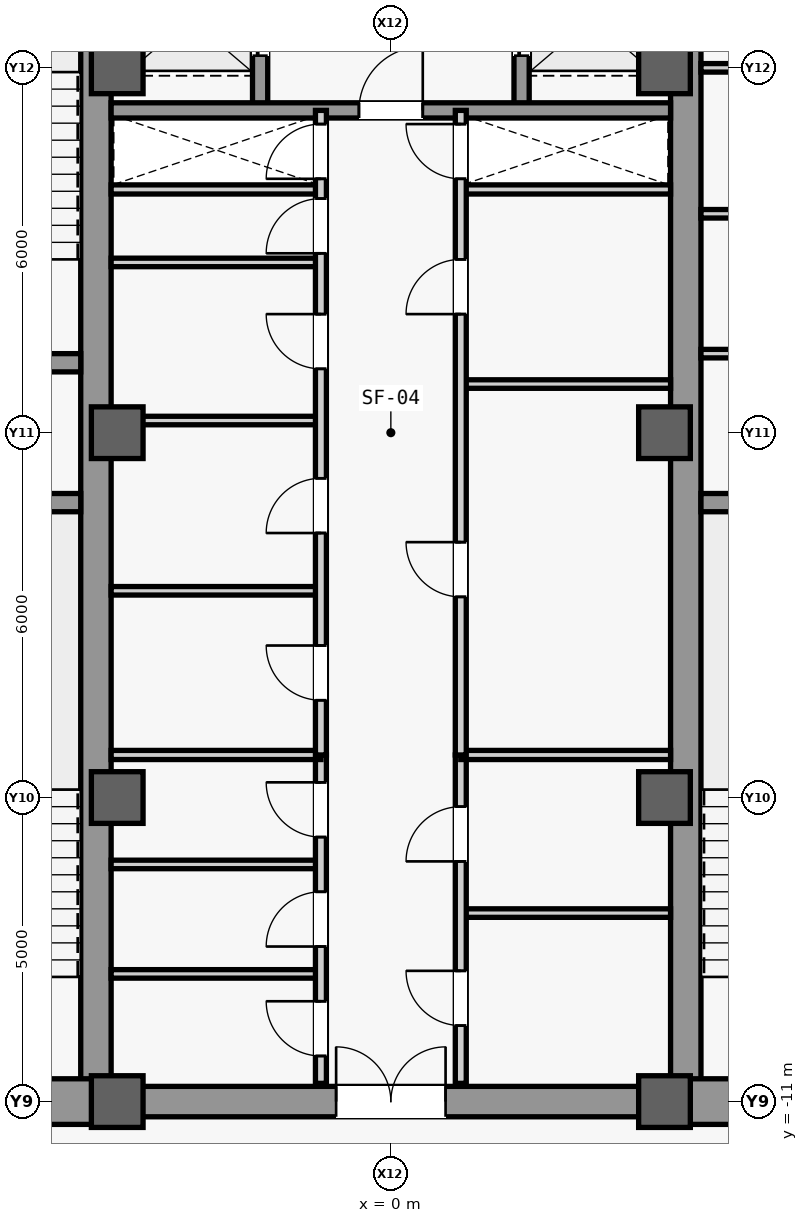
"""IFC4 building model, lengths in metres.
Left out: names, types, materials, properties, quantities, classifications, styles, units other than length and angle.
Written with IfcOpenShell. Run it as: python <this file> out.ifc"""

import sys

from ifc_helpers import new_model, si_unit, direction, frame, frame_2d, origin, origin_2d, place, context, subcontext, project, spatial, rectangle, extrude, source, transform, mapped, element, fill, save


model = new_model("IFC4")
c1 = context("Model", 3, precision=1e-05, world=origin(), true_north=direction((0.0, 1.0)))
c2 = subcontext(c1, "Body", "Model", "MODEL_VIEW")
j1 = project(units=[si_unit("LENGTHUNIT", "METRE"), si_unit("PLANEANGLEUNIT", "RADIAN")], contexts=[c1])
p1 = place(None, origin())
s1 = spatial("IfcSite", under=j1, at=p1, CompositionType="ELEMENT")
p2 = place(p1, origin())
s2 = spatial("IfcBuilding", under=s1, at=p2, CompositionType="ELEMENT")
p3 = place(p2, frame((0.0, 0.0, 155.1)))
s3 = spatial("IfcBuildingStorey", under=s2, at=p3, CompositionType="ELEMENT", Elevation=155.1)
m1 = source(origin(), c2, "Body", "SweptSolid", [
    extrude(rectangle(XDim=21.4, YDim=0.5, at=frame_2d((10.7, 0.0))), origin(), (0.0, 0.0, 1.0), 3.78),
])
for number, where, z_axis, x_axis in (
    (1, (-4.85, -10.7, 0.0), (0.0, 0.0, 1.0), (0.0, 1.0, 0.0)),
    (2, (4.85, -10.7, 0.0), (0.0, 0.0, 1.0), (0.0, 1.0, 0.0)),
):
    element("IfcWall", number, at=place(p3, frame(where, z_axis=z_axis, x_axis=x_axis)), inside=s3, PredefinedType="SHEAR", context=c2, shape_type="MappedRepresentation", body=[
        mapped(m1, transform((0.0, 0.0, 0.0), scale=1.0)),
    ])
m2 = source(origin(), c2, "Body", "SweptSolid", [
    extrude(rectangle(XDim=5.85, YDim=0.75, at=frame_2d((2.925, 0.0))), origin(), (0.0, 0.0, 1.0), 3.78),
])
for number, where, z_axis, x_axis in (
    (3, (-10.7, -11.0, 0.0), (0.0, 0.0, 1.0), (1.0, 0.0, 0.0)),
    (4, (4.85, -11.0, 0.0), (0.0, 0.0, 1.0), (1.0, 0.0, 0.0)),
):
    element("IfcWall", number, at=place(p3, frame(where, z_axis=z_axis, x_axis=x_axis)), inside=s3, PredefinedType="SHEAR", context=c2, shape_type="MappedRepresentation", body=[
        mapped(m2, transform((0.0, 0.0, 0.0), scale=1.0)),
    ])
m3 = source(origin(), c2, "Body", "SweptSolid", [
    extrude(rectangle(XDim=5.6, YDim=0.3, at=frame_2d((2.8, 0.0))), origin(), (0.0, 0.0, 1.0), 3.78),
])
for number, where, z_axis, x_axis in (
    (5, (-10.7, -1.15, 0.0), (0.0, 0.0, 1.0), (1.0, 0.0, 0.0)),
    (6, (-10.7, 1.15, 0.0), (0.0, 0.0, 1.0), (1.0, 0.0, 0.0)),
    (7, (5.1, -1.15, 0.0), (0.0, 0.0, 1.0), (1.0, 0.0, 0.0)),
):
    element("IfcWall", number, at=place(p3, frame(where, z_axis=z_axis, x_axis=x_axis)), inside=s3, PredefinedType="SHEAR", context=c2, shape_type="MappedRepresentation", body=[
        mapped(m3, transform((0.0, 0.0, 0.0), scale=1.0)),
    ])
m4 = source(origin(), c2, "Body", "SweptSolid", [
    extrude(rectangle(XDim=9.2, YDim=0.5, at=frame_2d((4.6, 0.0))), origin(), (0.0, 0.0, 1.0), 3.78),
])
p4 = place(p3, frame((-4.6, -11.0, 0.0), z_axis=(0.0, 0.0, 1.0), x_axis=(1.0, 0.0, 0.0)))
e8 = element("IfcWall", 8, at=p4, inside=s3, PredefinedType="SHEAR", context=c2, shape_type="MappedRepresentation", body=[
    mapped(m4, transform((0.0, 0.0, 0.0), scale=1.0)),
])
m5 = source(origin(), c2, "Body", "SweptSolid", [
    extrude(rectangle(XDim=1.8, YDim=2.25, at=frame_2d((0.9, 1.125))), frame((0.0, 0.26, 0.0), z_axis=(0.0, -1.0, 0.0), x_axis=(1.0, 0.0, 0.0)), (0.0, 0.0, 1.0), 0.52),
])
p5 = place(p4, frame((3.7, 0.0, 0.0)))
e9 = element("IfcOpeningElement", 9, at=p5, cuts=e8, PredefinedType="OPENING", context=c2, shape_type="MappedRepresentation", body=[
    mapped(m5, transform((0.0, 0.0, 0.0), scale=1.0)),
])
m6 = source(origin(), c2, "Body", "SweptSolid", [
    extrude(rectangle(XDim=0.85, YDim=0.85, at=origin_2d()), origin(), (0.0, 0.0, 1.0), 4.0),
])
for number, where, z_axis, x_axis in (
    (10, (-4.5, -11.0, 0.0), (0.0, 0.0, 1.0), (1.0, 0.0, 0.0)),
    (11, (-4.5, -6.0, 0.0), (0.0, 0.0, 1.0), (1.0, 0.0, 0.0)),
    (12, (-4.5, 0.0, 0.0), (0.0, 0.0, 1.0), (1.0, 0.0, 0.0)),
    (13, (-4.5, 6.0, 0.0), (0.0, 0.0, 1.0), (1.0, 0.0, 0.0)),
    (14, (4.5, -11.0, 0.0), (0.0, 0.0, 1.0), (1.0, 0.0, 0.0)),
    (15, (4.5, -6.0, 0.0), (0.0, 0.0, 1.0), (1.0, 0.0, 0.0)),
    (16, (4.5, 0.0, 0.0), (0.0, 0.0, 1.0), (1.0, 0.0, 0.0)),
    (17, (4.5, 6.0, 0.0), (0.0, 0.0, 1.0), (1.0, 0.0, 0.0)),
):
    element("IfcColumn", number, at=place(p3, frame(where, z_axis=z_axis, x_axis=x_axis)), inside=s3, PredefinedType="COLUMN", context=c2, shape_type="MappedRepresentation", body=[
        mapped(m6, transform((0.0, 0.0, 0.0), scale=1.0)),
    ])
m7 = source(origin(), c2, "Body", "SweptSolid", [
    extrude(rectangle(XDim=3.15, YDim=0.14, at=frame_2d((1.575, 0.0))), origin(), (0.0, 0.0, 1.0), 3.78),
])
p6 = place(p3, frame((5.1, 1.3, 0.0), z_axis=(0.0, 0.0, 1.0), x_axis=(1.0, 0.0, 0.0)))
e18 = element("IfcWall", 18, at=p6, inside=s3, PredefinedType="PARTITIONING", context=c2, shape_type="MappedRepresentation", body=[
    mapped(m7, transform((0.0, 0.0, 0.0), scale=1.0)),
])
p7 = place(p3, frame((5.1, 6.0, 0.0), z_axis=(0.0, 0.0, 1.0), x_axis=(1.0, 0.0, 0.0)))
e19 = element("IfcWall", 19, at=p7, inside=s3, PredefinedType="PARTITIONING", context=c2, shape_type="MappedRepresentation", body=[
    mapped(m7, transform((0.0, 0.0, 0.0), scale=1.0)),
])
m8 = source(origin(), c2, "Body", "SweptSolid", [
    extrude(rectangle(XDim=0.9, YDim=2.15, at=frame_2d((0.45, 1.075))), frame((0.0, 0.08, 0.0), z_axis=(0.0, -1.0, 0.0), x_axis=(1.0, 0.0, 0.0)), (0.0, 0.0, 1.0), 0.16),
])
p8 = place(p7, frame((1.13, 0.0, 0.0)))
e20 = element("IfcOpeningElement", 20, at=p8, cuts=e19, PredefinedType="OPENING", context=c2, shape_type="MappedRepresentation", body=[
    mapped(m8, transform((0.0, 0.0, 0.0), scale=1.0)),
])
p9 = place(p3, frame((5.1, 3.6, 0.0), z_axis=(0.0, 0.0, 1.0), x_axis=(1.0, 0.0, 0.0)))
e21 = element("IfcWall", 21, at=p9, inside=s3, PredefinedType="PARTITIONING", context=c2, shape_type="MappedRepresentation", body=[
    mapped(m7, transform((0.0, 0.0, 0.0), scale=1.0)),
])
p10 = place(p9, frame((1.13, 0.0, 0.0)))
e22 = element("IfcOpeningElement", 22, at=p10, cuts=e21, PredefinedType="OPENING", context=c2, shape_type="MappedRepresentation", body=[
    mapped(m8, transform((0.0, 0.0, 0.0), scale=1.0)),
])
m9 = source(origin(), c2, "Body", "SweptSolid", [
    extrude(rectangle(XDim=3.45, YDim=0.15, at=frame_2d((1.725, 0.0))), origin(), (0.0, 0.0, 1.0), 3.78),
])
for number, where, z_axis, x_axis in (
    (23, (-4.6, 4.0, 0.0), (0.0, 0.0, 1.0), (1.0, 0.0, 0.0)),
    (24, (1.15, 4.0, 0.0), (0.0, 0.0, 1.0), (1.0, 0.0, 0.0)),
):
    element("IfcWall", number, at=place(p3, frame(where, z_axis=z_axis, x_axis=x_axis)), inside=s3, PredefinedType="PARTITIONING", context=c2, shape_type="MappedRepresentation", body=[
        mapped(m9, transform((0.0, 0.0, 0.0), scale=1.0)),
    ])
m10 = source(origin(), c2, "Body", "SweptSolid", [
    extrude(rectangle(XDim=3.45, YDim=0.14, at=frame_2d((1.725, 0.0))), origin(), (0.0, 0.0, 1.0), 3.78),
])
for number, where, z_axis, x_axis in (
    (25, (-4.6, -8.9, 0.0), (0.0, 0.0, 1.0), (1.0, 0.0, 0.0)),
    (26, (-4.6, -7.1, 0.0), (0.0, 0.0, 1.0), (1.0, 0.0, 0.0)),
):
    element("IfcWall", number, at=place(p3, frame(where, z_axis=z_axis, x_axis=x_axis)), inside=s3, PredefinedType="PARTITIONING", context=c2, shape_type="MappedRepresentation", body=[
        mapped(m10, transform((0.0, 0.0, 0.0), scale=1.0)),
    ])
m11 = source(origin(), c2, "Body", "SweptSolid", [
    extrude(rectangle(XDim=5.4, YDim=0.18, at=frame_2d((2.7, 0.0))), origin(), (0.0, 0.0, 1.0), 3.78),
])
p11 = place(p3, frame((-1.15, -10.7, 0.0), z_axis=(0.0, 0.0, 1.0), x_axis=(0.0, 1.0, 0.0)))
e27 = element("IfcWall", 27, at=p11, inside=s3, PredefinedType="PARTITIONING", context=c2, shape_type="MappedRepresentation", body=[
    mapped(m11, transform((0.0, 0.0, 0.0), scale=1.0)),
])
m12 = source(origin(), c2, "Body", "SweptSolid", [
    extrude(rectangle(XDim=0.9, YDim=2.15, at=frame_2d((0.45, 1.075))), frame((0.0, 0.1, 0.0), z_axis=(0.0, -1.0, 0.0), x_axis=(1.0, 0.0, 0.0)), (0.0, 0.0, 1.0), 0.2),
])
p12 = place(p11, frame((0.45, 0.0, 0.0)))
e28 = element("IfcOpeningElement", 28, at=p12, cuts=e27, PredefinedType="OPENING", context=c2, shape_type="MappedRepresentation", body=[
    mapped(m12, transform((0.0, 0.0, 0.0), scale=1.0)),
])
p13 = place(p11, frame((2.25, 0.0, 0.0)))
e29 = element("IfcOpeningElement", 29, at=p13, cuts=e27, PredefinedType="OPENING", context=c2, shape_type="MappedRepresentation", body=[
    mapped(m12, transform((0.0, 0.0, 0.0), scale=1.0)),
])
p14 = place(p11, frame((4.05, 0.0, 0.0)))
e30 = element("IfcOpeningElement", 30, at=p14, cuts=e27, PredefinedType="OPENING", context=c2, shape_type="MappedRepresentation", body=[
    mapped(m12, transform((0.0, 0.0, 0.0), scale=1.0)),
])
p15 = place(p3, frame((1.15, -7.9, 0.0), z_axis=(0.0, 0.0, 1.0), x_axis=(1.0, 0.0, 0.0)))
e31 = element("IfcWall", 31, at=p15, inside=s3, PredefinedType="PARTITIONING", context=c2, shape_type="MappedRepresentation", body=[
    mapped(m10, transform((0.0, 0.0, 0.0), scale=1.0)),
])
p16 = place(p3, frame((1.15, -10.7, 0.0), z_axis=(0.0, 0.0, 1.0), x_axis=(0.0, 1.0, 0.0)))
e32 = element("IfcWall", 32, at=p16, inside=s3, PredefinedType="PARTITIONING", context=c2, shape_type="MappedRepresentation", body=[
    mapped(m11, transform((0.0, 0.0, 0.0), scale=1.0)),
])
p17 = place(p16, frame((0.95, 0.0, 0.0)))
e33 = element("IfcOpeningElement", 33, at=p17, cuts=e32, PredefinedType="OPENING", context=c2, shape_type="MappedRepresentation", body=[
    mapped(m12, transform((0.0, 0.0, 0.0), scale=1.0)),
])
p18 = place(p16, frame((3.65, 0.0, 0.0)))
e34 = element("IfcOpeningElement", 34, at=p18, cuts=e32, PredefinedType="OPENING", context=c2, shape_type="MappedRepresentation", body=[
    mapped(m12, transform((0.0, 0.0, 0.0), scale=1.0)),
])
for number, where, z_axis, x_axis in (
    (35, (-4.6, -5.3, 0.0), (0.0, 0.0, 1.0), (1.0, 0.0, 0.0)),
    (36, (1.15, -5.3, 0.0), (0.0, 0.0, 1.0), (1.0, 0.0, 0.0)),
):
    element("IfcWall", number, at=place(p3, frame(where, z_axis=z_axis, x_axis=x_axis)), inside=s3, PredefinedType="PARTITIONING", context=c2, shape_type="MappedRepresentation", body=[
        mapped(m9, transform((0.0, 0.0, 0.0), scale=1.0)),
    ])
m13 = source(origin(), c2, "Body", "SweptSolid", [
    extrude(rectangle(XDim=5.4, YDim=0.25, at=frame_2d((2.7, 0.0))), origin(), (0.0, 0.0, 1.0), 3.78),
])
p19 = place(p3, frame((-2.15, 5.3, 0.0), z_axis=(0.0, 0.0, 1.0), x_axis=(0.0, 1.0, 0.0)))
e37 = element("IfcWall", 37, at=p19, inside=s3, PredefinedType="SHEAR", context=c2, shape_type="MappedRepresentation", body=[
    mapped(m13, transform((0.0, 0.0, 0.0), scale=1.0)),
])
m14 = source(origin(), c2, "Body", "SweptSolid", [
    extrude(rectangle(XDim=1.2, YDim=2.3, at=frame_2d((0.6, 1.15))), frame((0.0, 0.135, 0.0), z_axis=(0.0, -1.0, 0.0), x_axis=(1.0, 0.0, 0.0)), (0.0, 0.0, 1.0), 0.27),
])
p20 = place(p19, frame((3.3, 0.0, 0.0)))
e38 = element("IfcOpeningElement", 38, at=p20, cuts=e37, PredefinedType="OPENING", context=c2, shape_type="MappedRepresentation", body=[
    mapped(m14, transform((0.0, 0.0, 0.0), scale=1.0)),
])
p21 = place(p19, frame((0.9, 0.0, 0.0)))
e39 = element("IfcOpeningElement", 39, at=p21, cuts=e37, PredefinedType="OPENING", context=c2, shape_type="MappedRepresentation", body=[
    mapped(m14, transform((0.0, 0.0, 0.0), scale=1.0)),
])
p22 = place(p3, frame((2.15, 5.3, 0.0), z_axis=(0.0, 0.0, 1.0), x_axis=(0.0, 1.0, 0.0)))
e40 = element("IfcWall", 40, at=p22, inside=s3, PredefinedType="SHEAR", context=c2, shape_type="MappedRepresentation", body=[
    mapped(m13, transform((0.0, 0.0, 0.0), scale=1.0)),
])
p23 = place(p22, frame((3.3, 0.0, 0.0)))
e41 = element("IfcOpeningElement", 41, at=p23, cuts=e40, PredefinedType="OPENING", context=c2, shape_type="MappedRepresentation", body=[
    mapped(m14, transform((0.0, 0.0, 0.0), scale=1.0)),
])
p24 = place(p22, frame((0.9, 0.0, 0.0)))
e42 = element("IfcOpeningElement", 42, at=p24, cuts=e40, PredefinedType="OPENING", context=c2, shape_type="MappedRepresentation", body=[
    mapped(m14, transform((0.0, 0.0, 0.0), scale=1.0)),
])
m15 = source(origin(), c2, "Body", "SweptSolid", [
    extrude(rectangle(XDim=9.2, YDim=0.25, at=frame_2d((4.6, 0.0))), origin(), (0.0, 0.0, 1.0), 3.78),
])
p25 = place(p3, frame((-4.6, 5.3, 0.0), z_axis=(0.0, 0.0, 1.0), x_axis=(1.0, 0.0, 0.0)))
e43 = element("IfcWall", 43, at=p25, inside=s3, PredefinedType="SHEAR", context=c2, shape_type="MappedRepresentation", body=[
    mapped(m15, transform((0.0, 0.0, 0.0), scale=1.0)),
])
m16 = source(origin(), c2, "Body", "SweptSolid", [
    extrude(rectangle(XDim=1.05, YDim=2.2, at=frame_2d((0.525, 1.1))), frame((0.0, 0.135, 0.0), z_axis=(0.0, -1.0, 0.0), x_axis=(1.0, 0.0, 0.0)), (0.0, 0.0, 1.0), 0.27),
])
p26 = place(p25, frame((4.075, 0.0, 0.0)))
e44 = element("IfcOpeningElement", 44, at=p26, cuts=e43, PredefinedType="OPENING", context=c2, shape_type="MappedRepresentation", body=[
    mapped(m16, transform((0.0, 0.0, 0.0), scale=1.0)),
])
p27 = place(p3, frame((-4.6, -2.6, 0.0), z_axis=(0.0, 0.0, 1.0), x_axis=(1.0, 0.0, 0.0)))
e45 = element("IfcWall", 45, at=p27, inside=s3, PredefinedType="PARTITIONING", context=c2, shape_type="MappedRepresentation", body=[
    mapped(m10, transform((0.0, 0.0, 0.0), scale=1.0)),
])
m17 = source(origin(), c2, "Body", "SweptSolid", [
    extrude(rectangle(XDim=3.45, YDim=0.14, at=frame_2d((1.725, 0.0))), origin(), (0.0, 0.0, 1.0), 3.085),
])
p28 = place(p3, frame((-4.6, 0.2, 0.0), z_axis=(0.0, 0.0, 1.0), x_axis=(1.0, 0.0, 0.0)))
e46 = element("IfcWall", 46, at=p28, inside=s3, PredefinedType="PARTITIONING", context=c2, shape_type="MappedRepresentation", body=[
    mapped(m17, transform((0.0, 0.0, 0.0), scale=1.0)),
])
p29 = place(p3, frame((-4.6, 2.8, 0.0), z_axis=(0.0, 0.0, 1.0), x_axis=(1.0, 0.0, 0.0)))
e47 = element("IfcWall", 47, at=p29, inside=s3, PredefinedType="PARTITIONING", context=c2, shape_type="MappedRepresentation", body=[
    mapped(m10, transform((0.0, 0.0, 0.0), scale=1.0)),
])
m18 = source(origin(), c2, "Body", "SweptSolid", [
    extrude(rectangle(XDim=10.6, YDim=0.18, at=frame_2d((5.3, 0.0))), origin(), (0.0, 0.0, 1.0), 3.78),
])
p30 = place(p3, frame((-1.15, -5.3, 0.0), z_axis=(0.0, 0.0, 1.0), x_axis=(0.0, 1.0, 0.0)))
e48 = element("IfcWall", 48, at=p30, inside=s3, PredefinedType="PARTITIONING", context=c2, shape_type="MappedRepresentation", body=[
    mapped(m18, transform((0.0, 0.0, 0.0), scale=1.0)),
])
p31 = place(p30, frame((0.9, 0.0, 0.0)))
e49 = element("IfcOpeningElement", 49, at=p31, cuts=e48, PredefinedType="OPENING", context=c2, shape_type="MappedRepresentation", body=[
    mapped(m12, transform((0.0, 0.0, 0.0), scale=1.0)),
])
p32 = place(p30, frame((3.65, 0.0, 0.0)))
e50 = element("IfcOpeningElement", 50, at=p32, cuts=e48, PredefinedType="OPENING", context=c2, shape_type="MappedRepresentation", body=[
    mapped(m12, transform((0.0, 0.0, 0.0), scale=1.0)),
])
p33 = place(p30, frame((6.35, 0.0, 0.0)))
e51 = element("IfcOpeningElement", 51, at=p33, cuts=e48, PredefinedType="OPENING", context=c2, shape_type="MappedRepresentation", body=[
    mapped(m12, transform((0.0, 0.0, 0.0), scale=1.0)),
])
p34 = place(p30, frame((8.25, 0.0, 0.0)))
e52 = element("IfcOpeningElement", 52, at=p34, cuts=e48, PredefinedType="OPENING", context=c2, shape_type="MappedRepresentation", body=[
    mapped(m12, transform((0.0, 0.0, 0.0), scale=1.0)),
])
p35 = place(p30, frame((9.475, 0.0, 0.0)))
e53 = element("IfcOpeningElement", 53, at=p35, cuts=e48, PredefinedType="OPENING", context=c2, shape_type="MappedRepresentation", body=[
    mapped(m12, transform((0.0, 0.0, 0.0), scale=1.0)),
])
p36 = place(p3, frame((1.15, 0.8, 0.0), z_axis=(0.0, 0.0, 1.0), x_axis=(1.0, 0.0, 0.0)))
e54 = element("IfcWall", 54, at=p36, inside=s3, PredefinedType="PARTITIONING", context=c2, shape_type="MappedRepresentation", body=[
    mapped(m10, transform((0.0, 0.0, 0.0), scale=1.0)),
])
p37 = place(p3, frame((1.15, -5.3, 0.0), z_axis=(0.0, 0.0, 1.0), x_axis=(0.0, 1.0, 0.0)))
e55 = element("IfcWall", 55, at=p37, inside=s3, PredefinedType="PARTITIONING", context=c2, shape_type="MappedRepresentation", body=[
    mapped(m18, transform((0.0, 0.0, 0.0), scale=1.0)),
])
p38 = place(p37, frame((2.6, 0.0, 0.0)))
e56 = element("IfcOpeningElement", 56, at=p38, cuts=e55, PredefinedType="OPENING", context=c2, shape_type="MappedRepresentation", body=[
    mapped(m12, transform((0.0, 0.0, 0.0), scale=1.0)),
])
p39 = place(p37, frame((7.25, 0.0, 0.0)))
e57 = element("IfcOpeningElement", 57, at=p39, cuts=e55, PredefinedType="OPENING", context=c2, shape_type="MappedRepresentation", body=[
    mapped(m12, transform((0.0, 0.0, 0.0), scale=1.0)),
])
p40 = place(p37, frame((9.475, 0.0, 0.0)))
e58 = element("IfcOpeningElement", 58, at=p40, cuts=e55, PredefinedType="OPENING", context=c2, shape_type="MappedRepresentation", body=[
    mapped(m12, transform((0.0, 0.0, 0.0), scale=1.0)),
])
m19 = source(origin(), c2, "Body", "SweptSolid", [
    extrude(rectangle(XDim=0.9, YDim=2.15, at=frame_2d((0.45, 1.075))), frame((0.0, 0.025, 0.0), z_axis=(0.0, -1.0, 0.0), x_axis=(1.0, 0.0, 0.0)), (0.0, 0.0, 1.0), 0.05),
])
p41 = place(p12, origin())
e59 = element("IfcDoor", 59, at=p41, inside=s3, OperationType="SINGLE_SWING_RIGHT", PredefinedType="DOOR", context=c2, shape_type="MappedRepresentation", body=[
    mapped(m19, transform((0.0, 0.0, 0.0), scale=1.0)),
])
fill(e28, e59)
p42 = place(p13, origin())
e60 = element("IfcDoor", 60, at=p42, inside=s3, OperationType="SINGLE_SWING_LEFT", PredefinedType="DOOR", context=c2, shape_type="MappedRepresentation", body=[
    mapped(m19, transform((0.0, 0.0, 0.0), scale=1.0)),
])
fill(e29, e60)
p43 = place(p14, origin())
e61 = element("IfcDoor", 61, at=p43, inside=s3, OperationType="SINGLE_SWING_RIGHT", PredefinedType="DOOR", context=c2, shape_type="MappedRepresentation", body=[
    mapped(m19, transform((0.0, 0.0, 0.0), scale=1.0)),
])
fill(e30, e61)
p44 = place(p17, origin())
e62 = element("IfcDoor", 62, at=p44, inside=s3, OperationType="SINGLE_SWING_RIGHT", PredefinedType="DOOR", context=c2, shape_type="MappedRepresentation", body=[
    mapped(m19, transform((0.0, 0.0, 0.0), scale=1.0)),
])
fill(e33, e62)
p45 = place(p18, origin())
e63 = element("IfcDoor", 63, at=p45, inside=s3, OperationType="SINGLE_SWING_LEFT", PredefinedType="DOOR", context=c2, shape_type="MappedRepresentation", body=[
    mapped(m19, transform((0.0, 0.0, 0.0), scale=1.0)),
])
fill(e34, e63)
m20 = source(origin(), c2, "Body", "SweptSolid", [
    extrude(rectangle(XDim=1.8, YDim=2.25, at=frame_2d((0.9, 1.125))), frame((0.0, 0.025, 0.0), z_axis=(0.0, -1.0, 0.0), x_axis=(1.0, 0.0, 0.0)), (0.0, 0.0, 1.0), 0.05),
])
p46 = place(p5, origin())
e64 = element("IfcDoor", 64, at=p46, inside=s3, OperationType="SINGLE_SWING_LEFT", PredefinedType="DOOR", context=c2, shape_type="MappedRepresentation", body=[
    mapped(m20, transform((0.0, 0.0, 0.0), scale=1.0)),
])
fill(e9, e64)
m21 = source(origin(), c2, "Body", "SweptSolid", [
    extrude(rectangle(XDim=1.05, YDim=2.2, at=frame_2d((0.525, 1.1))), frame((0.0, 0.025, 0.0), z_axis=(0.0, -1.0, 0.0), x_axis=(1.0, 0.0, 0.0)), (0.0, 0.0, 1.0), 0.05),
])
p47 = place(p26, origin())
e65 = element("IfcDoor", 65, at=p47, inside=s3, OperationType="SINGLE_SWING_RIGHT", PredefinedType="DOOR", context=c2, shape_type="MappedRepresentation", body=[
    mapped(m21, transform((0.0, 0.0, 0.0), scale=1.0)),
])
fill(e44, e65)
p48 = place(p31, origin())
e66 = element("IfcDoor", 66, at=p48, inside=s3, OperationType="SINGLE_SWING_RIGHT", PredefinedType="DOOR", context=c2, shape_type="MappedRepresentation", body=[
    mapped(m19, transform((0.0, 0.0, 0.0), scale=1.0)),
])
fill(e49, e66)
p49 = place(p32, origin())
e67 = element("IfcDoor", 67, at=p49, inside=s3, OperationType="SINGLE_SWING_LEFT", PredefinedType="DOOR", context=c2, shape_type="MappedRepresentation", body=[
    mapped(m19, transform((0.0, 0.0, 0.0), scale=1.0)),
])
fill(e50, e67)
p50 = place(p33, origin())
e68 = element("IfcDoor", 68, at=p50, inside=s3, OperationType="SINGLE_SWING_RIGHT", PredefinedType="DOOR", context=c2, shape_type="MappedRepresentation", body=[
    mapped(m19, transform((0.0, 0.0, 0.0), scale=1.0)),
])
fill(e51, e68)
p51 = place(p34, origin())
e69 = element("IfcDoor", 69, at=p51, inside=s3, OperationType="SINGLE_SWING_LEFT", PredefinedType="DOOR", context=c2, shape_type="MappedRepresentation", body=[
    mapped(m19, transform((0.0, 0.0, 0.0), scale=1.0)),
])
fill(e52, e69)
p52 = place(p38, origin())
e70 = element("IfcDoor", 70, at=p52, inside=s3, OperationType="SINGLE_SWING_RIGHT", PredefinedType="DOOR", context=c2, shape_type="MappedRepresentation", body=[
    mapped(m19, transform((0.0, 0.0, 0.0), scale=1.0)),
])
fill(e56, e70)
p53 = place(p39, origin())
e71 = element("IfcDoor", 71, at=p53, inside=s3, OperationType="SINGLE_SWING_LEFT", PredefinedType="DOOR", context=c2, shape_type="MappedRepresentation", body=[
    mapped(m19, transform((0.0, 0.0, 0.0), scale=1.0)),
])
fill(e57, e71)
p54 = place(p35, origin())
e72 = element("IfcDoor", 72, at=p54, inside=s3, OperationType="SINGLE_SWING_LEFT", PredefinedType="DOOR", context=c2, shape_type="MappedRepresentation", body=[
    mapped(m19, transform((0.0, 0.0, 0.0), scale=1.0)),
])
fill(e53, e72)
p55 = place(p40, origin())
e73 = element("IfcDoor", 73, at=p55, inside=s3, OperationType="SINGLE_SWING_RIGHT", PredefinedType="DOOR", context=c2, shape_type="MappedRepresentation", body=[
    mapped(m19, transform((0.0, 0.0, 0.0), scale=1.0)),
])
fill(e58, e73)
m22 = source(origin(), c2, "Body", "SweptSolid", [
    extrude(rectangle(XDim=1.2, YDim=2.3, at=frame_2d((0.6, 1.15))), frame((0.0, 0.025, 0.0), z_axis=(0.0, -1.0, 0.0), x_axis=(1.0, 0.0, 0.0)), (0.0, 0.0, 1.0), 0.05),
])
p56 = place(p21, origin())
e74 = element("IfcDoor", 74, at=p56, inside=s3, OperationType="SLIDING_TO_LEFT", PredefinedType="DOOR", context=c2, shape_type="MappedRepresentation", body=[
    mapped(m22, transform((0.0, 0.0, 0.0), scale=1.0)),
])
fill(e39, e74)
p57 = place(p24, origin())
e75 = element("IfcDoor", 75, at=p57, inside=s3, OperationType="SLIDING_TO_LEFT", PredefinedType="DOOR", context=c2, shape_type="MappedRepresentation", body=[
    mapped(m22, transform((0.0, 0.0, 0.0), scale=1.0)),
])
fill(e42, e75)
save(model, sys.argv[1])
